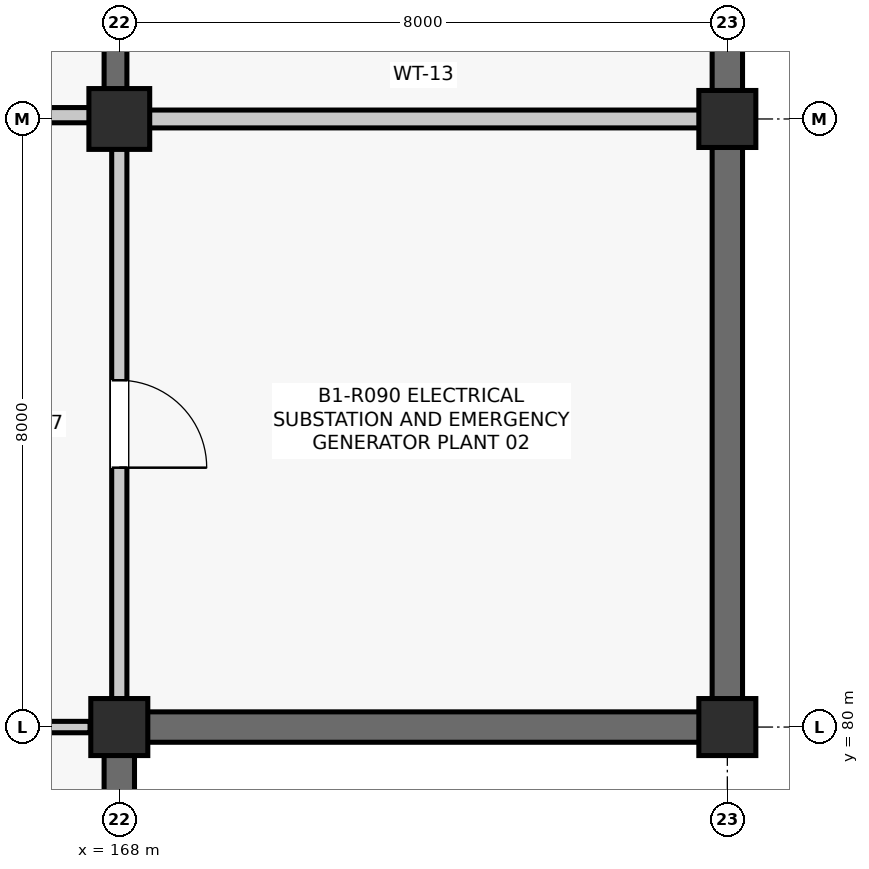
"""IFC4 building model, lengths in metres.
Left out: names, types, materials, properties, quantities, classifications, styles, units other than length and angle.
Written with IfcOpenShell. Run it as: python <this file> out.ifc"""

import sys

from ifc_helpers import new_model, si_unit, direction, frame, frame_2d, origin, origin_2d, place, context, subcontext, project, spatial, rectangle, extrude, element, fill, save


model = new_model("IFC4")
c1 = context("Model", 3, precision=1e-05, world=origin(), true_north=direction((0.0, 1.0)))
c2 = subcontext(c1, "Body", "Model", "MODEL_VIEW")
j1 = project(units=[si_unit("LENGTHUNIT", "METRE"), si_unit("PLANEANGLEUNIT", "RADIAN")], contexts=[c1])
p1 = place(None, origin())
s1 = spatial("IfcSite", under=j1, at=p1, CompositionType="ELEMENT")
p2 = place(p1, origin())
s2 = spatial("IfcBuilding", under=s1, at=p2, CompositionType="ELEMENT")
p3 = place(p2, frame((0.0, 0.0, -4.29)))
s3 = spatial("IfcBuildingStorey", under=s2, at=p3, CompositionType="ELEMENT", Elevation=-4.29)
p4 = place(p3, frame((168.0, 80.0, 0.0), z_axis=(0.0, 0.0, 1.0), x_axis=(1.0, 0.0, 0.0)))
e1 = element("IfcColumn", 1, at=p4, inside=s3, PredefinedType="COLUMN", context=c2, shape_type="SweptSolid", body=[
    extrude(rectangle(XDim=0.75, YDim=0.75, at=origin_2d()), origin(), (0.0, 0.0, 1.0), 4.29),
])
p5 = place(p3, frame((168.0, 88.0, 0.0), z_axis=(0.0, 0.0, 1.0), x_axis=(1.0, 0.0, 0.0)))
e2 = element("IfcColumn", 2, at=p5, inside=s3, PredefinedType="COLUMN", context=c2, shape_type="SweptSolid", body=[
    extrude(rectangle(XDim=0.8, YDim=0.8, at=origin_2d()), origin(), (0.0, 0.0, 1.0), 4.29),
])
for number, where, z_axis, x_axis in (
    (3, (176.0, 80.0, 0.0), (0.0, 0.0, 1.0), (1.0, 0.0, 0.0)),
    (4, (176.0, 88.0, 0.0), (0.0, 0.0, 1.0), (1.0, 0.0, 0.0)),
):
    element("IfcColumn", number, at=place(p3, frame(where, z_axis=z_axis, x_axis=x_axis)), inside=s3, PredefinedType="COLUMN", context=c2, shape_type="SweptSolid", body=[
        extrude(rectangle(XDim=0.75, YDim=0.75, at=origin_2d()), origin(), (0.0, 0.0, 1.0), 4.29),
    ])
p6 = place(p3, frame((168.0, 72.335, 0.0), z_axis=(0.0, 0.0, 1.0), x_axis=(0.0, 1.0, 0.0)))
e5 = element("IfcWall", 5, at=p6, inside=s3, PredefinedType="SHEAR", context=c2, shape_type="SweptSolid", body=[
    extrude(rectangle(XDim=7.305, YDim=0.4, at=frame_2d((3.652, 0.0))), origin(), (0.0, 0.0, 1.0), 3.401),
])
p7 = place(p3, frame((168.36, 80.0, 0.0), z_axis=(0.0, 0.0, 1.0), x_axis=(1.0, 0.0, 0.0)))
e6 = element("IfcWall", 6, at=p7, inside=s3, PredefinedType="SHEAR", context=c2, shape_type="SweptSolid", body=[
    extrude(rectangle(XDim=7.28, YDim=0.4, at=frame_2d((3.64, 0.0))), origin(), (0.0, 0.0, 1.0), 3.401),
])
p8 = place(p3, frame((176.0, 80.36, 0.0), z_axis=(0.0, 0.0, 1.0), x_axis=(0.0, 1.0, 0.0)))
e7 = element("IfcWall", 7, at=p8, inside=s3, PredefinedType="SHEAR", context=c2, shape_type="SweptSolid", body=[
    extrude(rectangle(XDim=7.28, YDim=0.4, at=frame_2d((3.64, 0.0))), origin(), (0.0, 0.0, 1.0), 3.667),
])
p9 = place(p3, frame((176.0, 88.36, 0.0), z_axis=(0.0, 0.0, 1.0), x_axis=(0.0, 1.0, 0.0)))
e8 = element("IfcWall", 8, at=p9, inside=s3, PredefinedType="SHEAR", context=c2, shape_type="SweptSolid", body=[
    extrude(rectangle(XDim=7.28, YDim=0.4, at=frame_2d((3.64, 0.0))), origin(), (0.0, 0.0, 1.0), 3.59),
])
p10 = place(p3, frame((167.95, 88.29, 0.0), z_axis=(0.0, 0.0, 1.0), x_axis=(0.0, 1.0, 0.0)))
e9 = element("IfcWall", 9, at=p10, inside=s3, PredefinedType="SHEAR", context=c2, shape_type="SweptSolid", body=[
    extrude(rectangle(XDim=7.42, YDim=0.3, at=frame_2d((3.71, 0.0))), origin(), (0.0, 0.0, 1.0), 4.015),
])
p11 = place(p3, frame((164.0, 88.05, 0.0), z_axis=(0.0, 0.0, 1.0), x_axis=(1.0, 0.0, 0.0)))
e10 = element("IfcWall", 10, at=p11, inside=s3, PredefinedType="PARTITIONING", context=c2, shape_type="SweptSolid", body=[
    extrude(rectangle(XDim=3.61, YDim=0.2, at=frame_2d((1.805, 0.0))), origin(), (0.0, 0.0, 1.0), 3.384),
])
p12 = place(p11, frame((1.205, 0.0, 0.0)))
e11 = element("IfcOpeningElement", 11, at=p12, cuts=e10, PredefinedType="OPENING", context=c2, shape_type="SweptSolid", body=[
    extrude(rectangle(XDim=1.2, YDim=2.15, at=frame_2d((0.6, 1.075))), frame((0.0, 0.11, 0.0), z_axis=(0.0, -1.0, 0.0), x_axis=(1.0, 0.0, 0.0)), (0.0, 0.0, 1.0), 0.22),
])
p13 = place(p3, frame((162.95, 80.0, 0.0), z_axis=(0.0, 0.0, 1.0), x_axis=(1.0, 0.0, 0.0)))
e12 = element("IfcWall", 12, at=p13, inside=s3, PredefinedType="PARTITIONING", context=c2, shape_type="SweptSolid", body=[
    extrude(rectangle(XDim=4.665, YDim=0.15, at=frame_2d((2.333, 0.0))), origin(), (0.0, 0.0, 1.0), 3.326),
])
p14 = place(p3, frame((168.0, 80.365, 0.0), z_axis=(0.0, 0.0, 1.0), x_axis=(0.0, 1.0, 0.0)))
e13 = element("IfcWall", 13, at=p14, inside=s3, PredefinedType="PARTITIONING", context=c2, shape_type="SweptSolid", body=[
    extrude(rectangle(XDim=7.245, YDim=0.2, at=frame_2d((3.623, 0.0))), origin(), (0.0, 0.0, 1.0), 3.461),
])
p15 = place(p14, frame((3.048, 0.0, 0.0)))
e14 = element("IfcOpeningElement", 14, at=p15, cuts=e13, PredefinedType="OPENING", context=c2, shape_type="SweptSolid", body=[
    extrude(rectangle(XDim=1.15, YDim=2.15, at=frame_2d((0.575, 1.075))), frame((0.0, 0.11, 0.0), z_axis=(0.0, -1.0, 0.0), x_axis=(1.0, 0.0, 0.0)), (0.0, 0.0, 1.0), 0.22),
])
p16 = place(p3, frame((168.39, 88.0, 0.0), z_axis=(0.0, 0.0, 1.0), x_axis=(1.0, 0.0, 0.0)))
e15 = element("IfcWall", 15, at=p16, inside=s3, PredefinedType="PARTITIONING", context=c2, shape_type="SweptSolid", body=[
    extrude(rectangle(XDim=7.245, YDim=0.235, at=frame_2d((3.623, 0.0))), origin(), (0.0, 0.0, 1.0), 3.307),
])
p17 = place(p15, frame((1.15, 0.0, 0.0), z_axis=(0.0, 0.0, 1.0), x_axis=(-1.0, 0.0, 0.0)))
e16 = element("IfcDoor", 16, at=p17, inside=s3, OperationType="SINGLE_SWING_LEFT", PredefinedType="DOOR", context=c2, shape_type="SweptSolid", body=[
    extrude(rectangle(XDim=1.15, YDim=2.15, at=frame_2d((0.575, 1.075))), frame((0.0, 0.025, 0.0), z_axis=(0.0, -1.0, 0.0), x_axis=(1.0, 0.0, 0.0)), (0.0, 0.0, 1.0), 0.05),
])
fill(e14, e16)
save(model, sys.argv[1])
